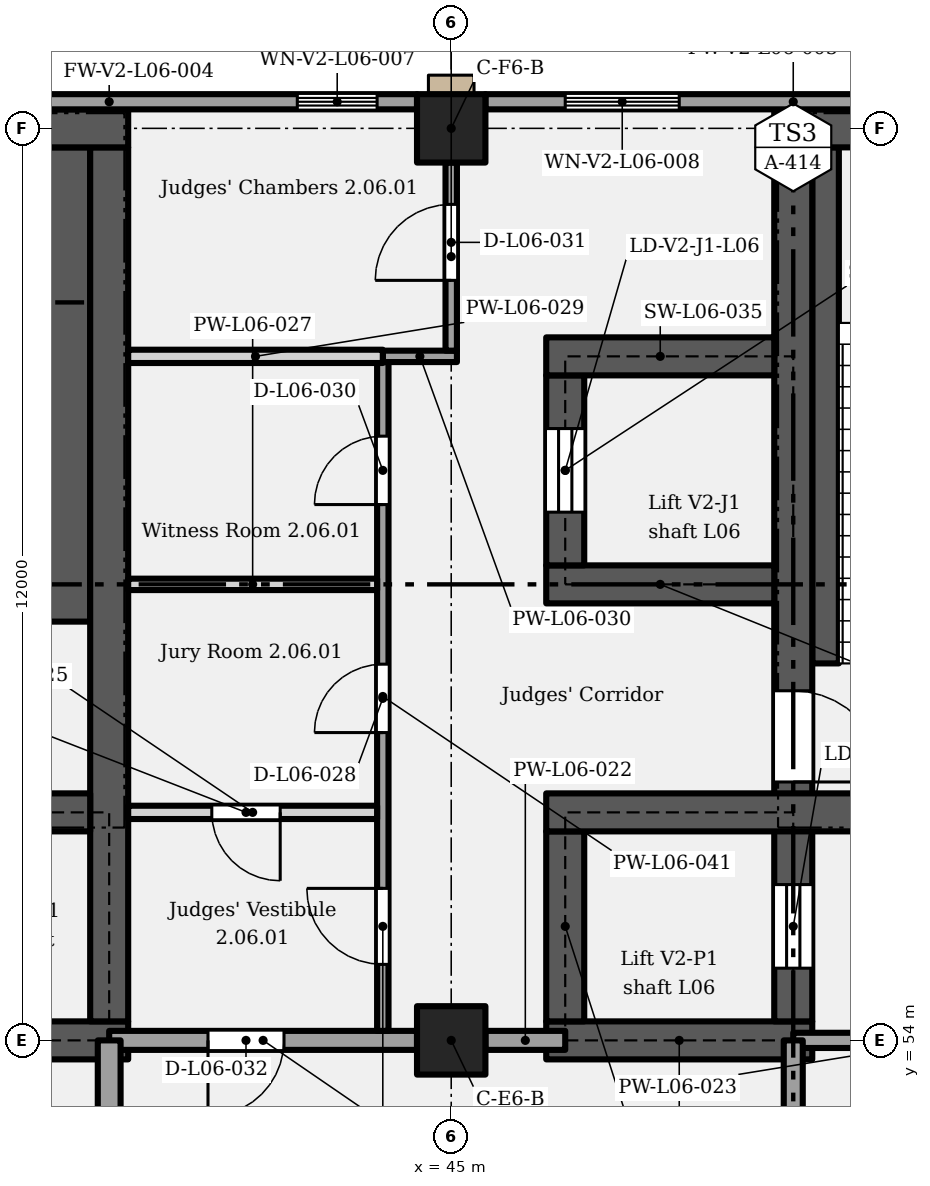
"""IFC4 building model, lengths in metres.
Left out: names, types, materials, properties, quantities, classifications, styles, units other than length and angle.
Written with IfcOpenShell. Run it as: python <this file> out.ifc"""

import sys

from ifc_helpers import new_model, si_unit, direction, frame, frame_2d, origin, origin_2d, place, context, subcontext, project, spatial, rectangle, extrude, element, fill, save


model = new_model("IFC4")
c1 = context("Model", 3, precision=1e-05, world=origin(), true_north=direction((0.0, 1.0)))
c2 = subcontext(c1, "Body", "Model", "MODEL_VIEW")
j1 = project(units=[si_unit("LENGTHUNIT", "METRE"), si_unit("PLANEANGLEUNIT", "RADIAN")], contexts=[c1])
p1 = place(None, origin())
s1 = spatial("IfcSite", under=j1, at=p1, CompositionType="ELEMENT")
p2 = place(p1, origin())
s2 = spatial("IfcBuilding", under=s1, at=p2, CompositionType="ELEMENT")
p3 = place(p2, frame((0.0, 0.0, 33.6)))
s3 = spatial("IfcBuildingStorey", under=s2, at=p3, CompositionType="ELEMENT", Elevation=33.6)
for number, where, z_axis, x_axis in (
    (1, (45.0, 54.0, 0.0), (0.0, 0.0, 1.0), (1.0, 0.0, 0.0)),
    (2, (45.0, 66.0, 0.0), (0.0, 0.0, 1.0), (1.0, 0.0, 0.0)),
):
    element("IfcColumn", number, at=place(p3, frame(where, z_axis=z_axis, x_axis=x_axis)), inside=s3, PredefinedType="COLUMN", context=c2, shape_type="SweptSolid", body=[
        extrude(rectangle(XDim=0.9, YDim=0.9, at=origin_2d()), origin(), (0.0, 0.0, 1.0), 5.4),
    ])
p4 = place(p3, frame((38.15, 54.0, 0.0), z_axis=(0.0, 0.0, 1.0), x_axis=(1.0, 0.0, 0.0)))
e3 = element("IfcWall", 3, at=p4, inside=s3, PredefinedType="SHEAR", context=c2, shape_type="SweptSolid", body=[
    extrude(rectangle(XDim=2.6, YDim=0.5, at=frame_2d((1.3, 0.0))), origin(), (0.0, 0.0, 1.0), 5.15),
])
p5 = place(p3, frame((46.25, 54.0, 0.0), z_axis=(0.0, 0.0, 1.0), x_axis=(1.0, 0.0, 0.0)))
e4 = element("IfcWall", 4, at=p5, inside=s3, PredefinedType="SHEAR", context=c2, shape_type="SweptSolid", body=[
    extrude(rectangle(XDim=3.5, YDim=0.5, at=frame_2d((1.75, 0.0))), origin(), (0.0, 0.0, 1.0), 5.15),
])
p6 = place(p3, frame((40.5, 54.25, 0.0), z_axis=(0.0, 0.0, 1.0), x_axis=(0.0, 1.0, 0.0)))
e5 = element("IfcWall", 5, at=p6, inside=s3, PredefinedType="SHEAR", context=c2, shape_type="SweptSolid", body=[
    extrude(rectangle(XDim=11.5, YDim=0.5, at=frame_2d((5.75, 0.0))), origin(), (0.0, 0.0, 1.0), 5.15),
])
p7 = place(p3, frame((46.5, 54.25, 0.0), z_axis=(0.0, 0.0, 1.0), x_axis=(0.0, 1.0, 0.0)))
e6 = element("IfcWall", 6, at=p7, inside=s3, PredefinedType="SHEAR", context=c2, shape_type="SweptSolid", body=[
    extrude(rectangle(XDim=2.5, YDim=0.5, at=frame_2d((1.25, 0.0))), origin(), (0.0, 0.0, 1.0), 5.15),
])
p8 = place(p3, frame((49.5, 54.25, 0.0), z_axis=(0.0, 0.0, 1.0), x_axis=(0.0, 1.0, 0.0)))
e7 = element("IfcWall", 7, at=p8, inside=s3, PredefinedType="SHEAR", context=c2, shape_type="SweptSolid", body=[
    extrude(rectangle(XDim=11.5, YDim=0.5, at=frame_2d((5.75, 0.0))), origin(), (0.0, 0.0, 1.0), 5.15),
])
p9 = place(p8, frame((0.7, 0.0, 0.0)))
e8 = element("IfcOpeningElement", 8, at=p9, cuts=e7, PredefinedType="OPENING", context=c2, shape_type="SweptSolid", body=[
    extrude(rectangle(XDim=1.1, YDim=2.1, at=frame_2d((0.55, 1.05))), frame((0.0, 0.26, 0.0), z_axis=(0.0, -1.0, 0.0), x_axis=(1.0, 0.0, 0.0)), (0.0, 0.0, 1.0), 0.52),
])
p10 = place(p8, frame((4.35, 0.0, 0.0), z_axis=(0.0, 0.0, 1.0), x_axis=(-1.0, 0.0, 0.0)))
e9 = element("IfcOpeningElement", 9, at=p10, cuts=e7, PredefinedType="OPENING", context=c2, shape_type="SweptSolid", body=[
    extrude(rectangle(XDim=1.2, YDim=2.1, at=frame_2d((0.6, 1.05))), frame((0.0, 0.26, 0.0), z_axis=(0.0, -1.0, 0.0), x_axis=(1.0, 0.0, 0.0)), (0.0, 0.0, 1.0), 0.52),
])
p11 = place(p3, frame((35.75, 57.0, 0.0), z_axis=(0.0, 0.0, 1.0), x_axis=(1.0, 0.0, 0.0)))
e10 = element("IfcWall", 10, at=p11, inside=s3, PredefinedType="SHEAR", context=c2, shape_type="SweptSolid", body=[
    extrude(rectangle(XDim=4.5, YDim=0.5, at=frame_2d((2.25, 0.0))), origin(), (0.0, 0.0, 1.0), 5.15),
])
p12 = place(p11, frame((0.85, 0.0, 0.0)))
e11 = element("IfcOpeningElement", 11, at=p12, cuts=e10, PredefinedType="OPENING", context=c2, shape_type="SweptSolid", body=[
    extrude(rectangle(XDim=1.2, YDim=2.1, at=frame_2d((0.6, 1.05))), frame((0.0, 0.26, 0.0), z_axis=(0.0, -1.0, 0.0), x_axis=(1.0, 0.0, 0.0)), (0.0, 0.0, 1.0), 0.52),
])
p13 = place(p3, frame((46.25, 57.0, 0.0), z_axis=(0.0, 0.0, 1.0), x_axis=(1.0, 0.0, 0.0)))
e12 = element("IfcWall", 12, at=p13, inside=s3, PredefinedType="SHEAR", context=c2, shape_type="SweptSolid", body=[
    extrude(rectangle(XDim=11.0, YDim=0.5, at=frame_2d((5.5, 0.0))), origin(), (0.0, 0.0, 1.0), 5.15),
])
p14 = place(p13, frame((4.9, 0.0, 0.0)))
e13 = element("IfcOpeningElement", 13, at=p14, cuts=e12, PredefinedType="OPENING", context=c2, shape_type="SweptSolid", body=[
    extrude(rectangle(XDim=1.2, YDim=2.1, at=frame_2d((0.6, 1.05))), frame((0.0, 0.26, 0.0), z_axis=(0.0, -1.0, 0.0), x_axis=(1.0, 0.0, 0.0)), (0.0, 0.0, 1.0), 0.52),
])
p15 = place(p3, frame((46.25, 60.0, 0.0), z_axis=(0.0, 0.0, 1.0), x_axis=(1.0, 0.0, 0.0)))
e14 = element("IfcWall", 14, at=p15, inside=s3, PredefinedType="SHEAR", context=c2, shape_type="SweptSolid", body=[
    extrude(rectangle(XDim=3.0, YDim=0.5, at=frame_2d((1.5, 0.0))), origin(), (0.0, 0.0, 1.0), 5.15),
])
p16 = place(p3, frame((46.5, 60.25, 0.0), z_axis=(0.0, 0.0, 1.0), x_axis=(0.0, 1.0, 0.0)))
e15 = element("IfcWall", 15, at=p16, inside=s3, PredefinedType="SHEAR", context=c2, shape_type="SweptSolid", body=[
    extrude(rectangle(XDim=2.5, YDim=0.5, at=frame_2d((1.25, 0.0))), origin(), (0.0, 0.0, 1.0), 5.15),
])
p17 = place(p16, frame((0.7, 0.0, 0.0)))
e16 = element("IfcOpeningElement", 16, at=p17, cuts=e15, PredefinedType="OPENING", context=c2, shape_type="SweptSolid", body=[
    extrude(rectangle(XDim=1.1, YDim=2.1, at=frame_2d((0.55, 1.05))), frame((0.0, 0.26, 0.0), z_axis=(0.0, -1.0, 0.0), x_axis=(1.0, 0.0, 0.0)), (0.0, 0.0, 1.0), 0.52),
])
p18 = place(p3, frame((46.25, 63.0, 0.0), z_axis=(0.0, 0.0, 1.0), x_axis=(1.0, 0.0, 0.0)))
e17 = element("IfcWall", 17, at=p18, inside=s3, PredefinedType="SHEAR", context=c2, shape_type="SweptSolid", body=[
    extrude(rectangle(XDim=3.0, YDim=0.5, at=frame_2d((1.5, 0.0))), origin(), (0.0, 0.0, 1.0), 5.15),
])
for number, where, z_axis, x_axis in (
    (18, (36.45, 66.0, 0.0), (0.0, 0.0, 1.0), (1.0, 0.0, 0.0)),
    (19, (49.25, 66.0, 0.0), (0.0, 0.0, 1.0), (1.0, 0.0, 0.0)),
):
    element("IfcWall", number, at=place(p3, frame(where, z_axis=z_axis, x_axis=x_axis)), inside=s3, PredefinedType="SHEAR", context=c2, shape_type="SweptSolid", body=[
        extrude(rectangle(XDim=4.3, YDim=0.5, at=frame_2d((2.15, 0.0))), origin(), (0.0, 0.0, 1.0), 5.15),
    ])
p19 = place(p3, frame((36.45, 66.35, 0.0), z_axis=(0.0, 0.0, 1.0), x_axis=(1.0, 0.0, 0.0)))
e20 = element("IfcWall", 20, at=p19, inside=s3, PredefinedType="SOLIDWALL", context=c2, shape_type="SweptSolid", body=[
    extrude(rectangle(XDim=8.1, YDim=0.2, at=frame_2d((4.05, 0.0))), origin(), (0.0, 0.0, 1.0), 5.15),
])
p20 = place(p19, frame((6.525, 0.0, 1.05)))
e21 = element("IfcOpeningElement", 21, at=p20, cuts=e20, PredefinedType="OPENING", context=c2, shape_type="SweptSolid", body=[
    extrude(rectangle(XDim=1.05, YDim=2.4, at=frame_2d((0.525, 1.2))), frame((0.0, 0.11, 0.0), z_axis=(0.0, -1.0, 0.0), x_axis=(1.0, 0.0, 0.0)), (0.0, 0.0, 1.0), 0.22),
])
p21 = place(p3, frame((45.45, 66.35, 0.0), z_axis=(0.0, 0.0, 1.0), x_axis=(1.0, 0.0, 0.0)))
e22 = element("IfcWall", 22, at=p21, inside=s3, PredefinedType="SOLIDWALL", context=c2, shape_type="SweptSolid", body=[
    extrude(rectangle(XDim=8.1, YDim=0.2, at=frame_2d((4.05, 0.0))), origin(), (0.0, 0.0, 1.0), 5.15),
])
p22 = place(p21, frame((1.05, 0.0, 1.05)))
e23 = element("IfcOpeningElement", 23, at=p22, cuts=e22, PredefinedType="OPENING", context=c2, shape_type="SweptSolid", body=[
    extrude(rectangle(XDim=1.5, YDim=3.5, at=frame_2d((0.75, 1.75))), frame((0.0, 0.11, 0.0), z_axis=(0.0, -1.0, 0.0), x_axis=(1.0, 0.0, 0.0)), (0.0, 0.0, 1.0), 0.22),
])
p23 = place(p3, frame((40.5, 54.0, 0.0), z_axis=(0.0, 0.0, 1.0), x_axis=(1.0, 0.0, 0.0)))
e24 = element("IfcWall", 24, at=p23, inside=s3, PredefinedType="PARTITIONING", context=c2, shape_type="SweptSolid", body=[
    extrude(rectangle(XDim=4.05, YDim=0.25, at=frame_2d((2.025, 0.0))), origin(), (0.0, 0.0, 1.0), 4.4),
])
p24 = place(p23, frame((2.3, 0.0, 0.0), z_axis=(0.0, 0.0, 1.0), x_axis=(-1.0, 0.0, 0.0)))
e25 = element("IfcOpeningElement", 25, at=p24, cuts=e24, PredefinedType="OPENING", context=c2, shape_type="SweptSolid", body=[
    extrude(rectangle(XDim=1.0, YDim=2.1, at=frame_2d((0.5, 1.05))), frame((0.0, 0.135, 0.0), z_axis=(0.0, -1.0, 0.0), x_axis=(1.0, 0.0, 0.0)), (0.0, 0.0, 1.0), 0.27),
])
p25 = place(p3, frame((45.45, 54.0, 0.0), z_axis=(0.0, 0.0, 1.0), x_axis=(1.0, 0.0, 0.0)))
e26 = element("IfcWall", 26, at=p25, inside=s3, PredefinedType="PARTITIONING", context=c2, shape_type="SweptSolid", body=[
    extrude(rectangle(XDim=1.05, YDim=0.25, at=frame_2d((0.525, 0.0))), origin(), (0.0, 0.0, 1.0), 4.4),
])
p26 = place(p3, frame((49.5, 54.0, 0.0), z_axis=(0.0, 0.0, 1.0), x_axis=(1.0, 0.0, 0.0)))
e27 = element("IfcWall", 27, at=p26, inside=s3, PredefinedType="PARTITIONING", context=c2, shape_type="SweptSolid", body=[
    extrude(rectangle(XDim=4.05, YDim=0.2, at=frame_2d((2.025, 0.0))), origin(), (0.0, 0.0, 1.0), 4.4),
])
p27 = place(p26, frame((1.35, 0.0, 0.0)))
e28 = element("IfcOpeningElement", 28, at=p27, cuts=e27, PredefinedType="OPENING", context=c2, shape_type="SweptSolid", body=[
    extrude(rectangle(XDim=1.8, YDim=2.1, at=frame_2d((0.9, 1.05))), frame((0.0, 0.11, 0.0), z_axis=(0.0, -1.0, 0.0), x_axis=(1.0, 0.0, 0.0)), (0.0, 0.0, 1.0), 0.22),
])
p28 = place(p3, frame((40.75, 57.0, 0.0), z_axis=(0.0, 0.0, 1.0), x_axis=(1.0, 0.0, 0.0)))
e29 = element("IfcWall", 29, at=p28, inside=s3, PredefinedType="PARTITIONING", context=c2, shape_type="SweptSolid", body=[
    extrude(rectangle(XDim=3.275, YDim=0.175, at=frame_2d((1.637, 0.0))), origin(), (0.0, 0.0, 1.0), 5.15),
])
p29 = place(p28, frame((2.0, 0.0, 0.0), z_axis=(0.0, 0.0, 1.0), x_axis=(-1.0, 0.0, 0.0)))
e30 = element("IfcOpeningElement", 30, at=p29, cuts=e29, PredefinedType="OPENING", context=c2, shape_type="SweptSolid", body=[
    extrude(rectangle(XDim=0.9, YDim=2.1, at=frame_2d((0.45, 1.05))), frame((0.0, 0.097, 0.0), z_axis=(0.0, -1.0, 0.0), x_axis=(1.0, 0.0, 0.0)), (0.0, 0.0, 1.0), 0.195),
])
p30 = place(p3, frame((40.75, 60.0, 0.0), z_axis=(0.0, 0.0, 1.0), x_axis=(1.0, 0.0, 0.0)))
e31 = element("IfcWall", 31, at=p30, inside=s3, PredefinedType="PARTITIONING", context=c2, shape_type="SweptSolid", body=[
    extrude(rectangle(XDim=3.275, YDim=0.15, at=frame_2d((1.637, 0.0))), origin(), (0.0, 0.0, 1.0), 5.15),
])
p31 = place(p3, frame((40.75, 63.0, 0.0), z_axis=(0.0, 0.0, 1.0), x_axis=(1.0, 0.0, 0.0)))
e32 = element("IfcWall", 32, at=p31, inside=s3, PredefinedType="PARTITIONING", context=c2, shape_type="SweptSolid", body=[
    extrude(rectangle(XDim=3.35, YDim=0.175, at=frame_2d((1.675, 0.0))), origin(), (0.0, 0.0, 1.0), 5.15),
])
p32 = place(p3, frame((44.1, 63.0, 0.0), z_axis=(0.0, 0.0, 1.0), x_axis=(1.0, 0.0, 0.0)))
e33 = element("IfcWall", 33, at=p32, inside=s3, PredefinedType="PARTITIONING", context=c2, shape_type="SweptSolid", body=[
    extrude(rectangle(XDim=0.975, YDim=0.15, at=frame_2d((0.487, 0.0))), origin(), (0.0, 0.0, 1.0), 5.15),
])
p33 = place(p3, frame((40.5, 43.65, 0.0), z_axis=(0.0, 0.0, 1.0), x_axis=(0.0, 1.0, 0.0)))
e34 = element("IfcWall", 34, at=p33, inside=s3, PredefinedType="PARTITIONING", context=c2, shape_type="SweptSolid", body=[
    extrude(rectangle(XDim=10.35, YDim=0.3, at=frame_2d((5.175, 0.0))), origin(), (0.0, 0.0, 1.0), 5.15),
])
p34 = place(p33, frame((9.35, 0.0, 0.0), z_axis=(0.0, 0.0, 1.0), x_axis=(-1.0, 0.0, 0.0)))
e35 = element("IfcOpeningElement", 35, at=p34, cuts=e34, PredefinedType="OPENING", context=c2, shape_type="SweptSolid", body=[
    extrude(rectangle(XDim=1.0, YDim=2.0, at=frame_2d((0.5, 1.0))), frame((0.0, 0.16, 0.0), z_axis=(0.0, -1.0, 0.0), x_axis=(1.0, 0.0, 0.0)), (0.0, 0.0, 1.0), 0.32),
])
p35 = place(p3, frame((44.1, 54.125, 0.0), z_axis=(0.0, 0.0, 1.0), x_axis=(0.0, 1.0, 0.0)))
e36 = element("IfcWall", 36, at=p35, inside=s3, PredefinedType="PARTITIONING", context=c2, shape_type="SweptSolid", body=[
    extrude(rectangle(XDim=8.8, YDim=0.15, at=frame_2d((4.4, 0.0))), origin(), (0.0, 0.0, 1.0), 5.15),
])
p36 = place(p35, frame((0.875, 0.0, 0.0)))
e37 = element("IfcOpeningElement", 37, at=p36, cuts=e36, PredefinedType="OPENING", context=c2, shape_type="SweptSolid", body=[
    extrude(rectangle(XDim=1.0, YDim=2.1, at=frame_2d((0.5, 1.05))), frame((0.0, 0.085, 0.0), z_axis=(0.0, -1.0, 0.0), x_axis=(1.0, 0.0, 0.0)), (0.0, 0.0, 1.0), 0.17),
])
p37 = place(p35, frame((3.925, 0.0, 0.0)))
e38 = element("IfcOpeningElement", 38, at=p37, cuts=e36, PredefinedType="OPENING", context=c2, shape_type="SweptSolid", body=[
    extrude(rectangle(XDim=0.9, YDim=2.1, at=frame_2d((0.45, 1.05))), frame((0.0, 0.085, 0.0), z_axis=(0.0, -1.0, 0.0), x_axis=(1.0, 0.0, 0.0)), (0.0, 0.0, 1.0), 0.17),
])
p38 = place(p35, frame((6.925, 0.0, 0.0)))
e39 = element("IfcOpeningElement", 39, at=p38, cuts=e36, PredefinedType="OPENING", context=c2, shape_type="SweptSolid", body=[
    extrude(rectangle(XDim=0.9, YDim=2.1, at=frame_2d((0.45, 1.05))), frame((0.0, 0.085, 0.0), z_axis=(0.0, -1.0, 0.0), x_axis=(1.0, 0.0, 0.0)), (0.0, 0.0, 1.0), 0.17),
])
p39 = place(p3, frame((45.0, 63.075, 0.0), z_axis=(0.0, 0.0, 1.0), x_axis=(0.0, 1.0, 0.0)))
e40 = element("IfcWall", 40, at=p39, inside=s3, PredefinedType="PARTITIONING", context=c2, shape_type="SweptSolid", body=[
    extrude(rectangle(XDim=2.475, YDim=0.15, at=frame_2d((1.238, 0.0))), origin(), (0.0, 0.0, 1.0), 4.4),
])
p40 = place(p39, frame((0.925, 0.0, 0.0)))
e41 = element("IfcOpeningElement", 41, at=p40, cuts=e40, PredefinedType="OPENING", context=c2, shape_type="SweptSolid", body=[
    extrude(rectangle(XDim=1.0, YDim=2.1, at=frame_2d((0.5, 1.05))), frame((0.0, 0.085, 0.0), z_axis=(0.0, -1.0, 0.0), x_axis=(1.0, 0.0, 0.0)), (0.0, 0.0, 1.0), 0.17),
])
p41 = place(p3, frame((49.5, 43.5, 0.0), z_axis=(0.0, 0.0, 1.0), x_axis=(0.0, 1.0, 0.0)))
e42 = element("IfcWall", 42, at=p41, inside=s3, PredefinedType="PARTITIONING", context=c2, shape_type="SweptSolid", body=[
    extrude(rectangle(XDim=10.5, YDim=0.25, at=frame_2d((5.25, 0.0))), origin(), (0.0, 0.0, 1.0), 5.15),
])
p42 = place(p41, frame((0.6, 0.0, 0.0)))
e43 = element("IfcOpeningElement", 43, at=p42, cuts=e42, PredefinedType="OPENING", context=c2, shape_type="SweptSolid", body=[
    extrude(rectangle(XDim=1.8, YDim=2.4, at=frame_2d((0.9, 1.2))), frame((0.0, 0.135, 0.0), z_axis=(0.0, -1.0, 0.0), x_axis=(1.0, 0.0, 0.0)), (0.0, 0.0, 1.0), 0.27),
])
p43 = place(p41, frame((7.1, 0.0, 0.0)))
e44 = element("IfcOpeningElement", 44, at=p43, cuts=e42, PredefinedType="OPENING", context=c2, shape_type="SweptSolid", body=[
    extrude(rectangle(XDim=1.8, YDim=2.4, at=frame_2d((0.9, 1.2))), frame((0.0, 0.135, 0.0), z_axis=(0.0, -1.0, 0.0), x_axis=(1.0, 0.0, 0.0)), (0.0, 0.0, 1.0), 0.27),
])
p44 = place(p3, frame((39.905, 59.51, 0.0), z_axis=(0.0, 0.0, 1.0), x_axis=(0.0, 1.0, 0.0)))
e45 = element("IfcWall", 45, at=p44, inside=s3, PredefinedType="SHEAR", context=c2, shape_type="SweptSolid", body=[
    extrude(rectangle(XDim=6.24, YDim=0.69, at=frame_2d((3.12, 0.0))), origin(), (0.0, 0.0, 1.0), 2.587),
])
p45 = place(p3, frame((49.925, 58.96, 0.0), z_axis=(0.0, 0.0, 1.0), x_axis=(0.0, 1.0, 0.0)))
e46 = element("IfcWall", 46, at=p45, inside=s3, PredefinedType="SHEAR", context=c2, shape_type="SweptSolid", body=[
    extrude(rectangle(XDim=6.79, YDim=0.35, at=frame_2d((3.395, 0.0))), origin(), (0.0, 0.0, 1.0), 2.587),
])
p46 = place(p20, origin())
e47 = element("IfcWindow", 47, at=p46, inside=s3, PartitioningType="SINGLE_PANEL", PredefinedType="WINDOW", context=c2, shape_type="SweptSolid", body=[
    extrude(rectangle(XDim=1.05, YDim=2.4, at=frame_2d((0.525, 1.2))), frame((0.0, 0.03, 0.0), z_axis=(0.0, -1.0, 0.0), x_axis=(1.0, 0.0, 0.0)), (0.0, 0.0, 1.0), 0.06),
])
fill(e21, e47)
p47 = place(p22, origin())
e48 = element("IfcWindow", 48, at=p47, inside=s3, PartitioningType="SINGLE_PANEL", PredefinedType="WINDOW", context=c2, shape_type="SweptSolid", body=[
    extrude(rectangle(XDim=1.5, YDim=3.5, at=frame_2d((0.75, 1.75))), frame((0.0, 0.03, 0.0), z_axis=(0.0, -1.0, 0.0), x_axis=(1.0, 0.0, 0.0)), (0.0, 0.0, 1.0), 0.06),
])
fill(e23, e48)
p48 = place(p9, origin())
e49 = element("IfcDoor", 49, at=p48, inside=s3, OperationType="SLIDING_TO_LEFT", PredefinedType="DOOR", context=c2, shape_type="SweptSolid", body=[
    extrude(rectangle(XDim=1.1, YDim=2.1, at=frame_2d((0.55, 1.05))), frame((0.0, 0.025, 0.0), z_axis=(0.0, -1.0, 0.0), x_axis=(1.0, 0.0, 0.0)), (0.0, 0.0, 1.0), 0.05),
])
fill(e8, e49)
p49 = place(p17, origin())
e50 = element("IfcDoor", 50, at=p49, inside=s3, OperationType="SLIDING_TO_LEFT", PredefinedType="DOOR", context=c2, shape_type="SweptSolid", body=[
    extrude(rectangle(XDim=1.1, YDim=2.1, at=frame_2d((0.55, 1.05))), frame((0.0, 0.025, 0.0), z_axis=(0.0, -1.0, 0.0), x_axis=(1.0, 0.0, 0.0)), (0.0, 0.0, 1.0), 0.05),
])
fill(e16, e50)
p50 = place(p10, origin())
e51 = element("IfcDoor", 51, at=p50, inside=s3, OperationType="SINGLE_SWING_RIGHT", PredefinedType="DOOR", context=c2, shape_type="SweptSolid", body=[
    extrude(rectangle(XDim=1.2, YDim=2.1, at=frame_2d((0.6, 1.05))), frame((0.0, 0.025, 0.0), z_axis=(0.0, -1.0, 0.0), x_axis=(1.0, 0.0, 0.0)), (0.0, 0.0, 1.0), 0.05),
])
fill(e9, e51)
p51 = place(p36, origin())
e52 = element("IfcDoor", 52, at=p51, inside=s3, OperationType="SINGLE_SWING_RIGHT", PredefinedType="DOOR", context=c2, shape_type="SweptSolid", body=[
    extrude(rectangle(XDim=1.0, YDim=2.1, at=frame_2d((0.5, 1.05))), frame((0.0, 0.025, 0.0), z_axis=(0.0, -1.0, 0.0), x_axis=(1.0, 0.0, 0.0)), (0.0, 0.0, 1.0), 0.05),
])
fill(e37, e52)
p52 = place(p37, origin())
e53 = element("IfcDoor", 53, at=p52, inside=s3, OperationType="SINGLE_SWING_LEFT", PredefinedType="DOOR", context=c2, shape_type="SweptSolid", body=[
    extrude(rectangle(XDim=0.9, YDim=2.1, at=frame_2d((0.45, 1.05))), frame((0.0, 0.025, 0.0), z_axis=(0.0, -1.0, 0.0), x_axis=(1.0, 0.0, 0.0)), (0.0, 0.0, 1.0), 0.05),
])
fill(e38, e53)
p53 = place(p29, origin())
e54 = element("IfcDoor", 54, at=p53, inside=s3, OperationType="SINGLE_SWING_LEFT", PredefinedType="DOOR", context=c2, shape_type="SweptSolid", body=[
    extrude(rectangle(XDim=0.9, YDim=2.1, at=frame_2d((0.45, 1.05))), frame((0.0, 0.025, 0.0), z_axis=(0.0, -1.0, 0.0), x_axis=(1.0, 0.0, 0.0)), (0.0, 0.0, 1.0), 0.05),
])
fill(e30, e54)
p54 = place(p38, origin())
e55 = element("IfcDoor", 55, at=p54, inside=s3, OperationType="SINGLE_SWING_LEFT", PredefinedType="DOOR", context=c2, shape_type="SweptSolid", body=[
    extrude(rectangle(XDim=0.9, YDim=2.1, at=frame_2d((0.45, 1.05))), frame((0.0, 0.025, 0.0), z_axis=(0.0, -1.0, 0.0), x_axis=(1.0, 0.0, 0.0)), (0.0, 0.0, 1.0), 0.05),
])
fill(e39, e55)
p55 = place(p40, origin())
e56 = element("IfcDoor", 56, at=p55, inside=s3, OperationType="SINGLE_SWING_LEFT", PredefinedType="DOOR", context=c2, shape_type="SweptSolid", body=[
    extrude(rectangle(XDim=1.0, YDim=2.1, at=frame_2d((0.5, 1.05))), frame((0.0, 0.025, 0.0), z_axis=(0.0, -1.0, 0.0), x_axis=(1.0, 0.0, 0.0)), (0.0, 0.0, 1.0), 0.05),
])
fill(e41, e56)
p56 = place(p24, origin())
e57 = element("IfcDoor", 57, at=p56, inside=s3, OperationType="SINGLE_SWING_RIGHT", PredefinedType="DOOR", context=c2, shape_type="SweptSolid", body=[
    extrude(rectangle(XDim=1.0, YDim=2.1, at=frame_2d((0.5, 1.05))), frame((0.0, 0.025, 0.0), z_axis=(0.0, -1.0, 0.0), x_axis=(1.0, 0.0, 0.0)), (0.0, 0.0, 1.0), 0.05),
])
fill(e25, e57)
save(model, sys.argv[1])
